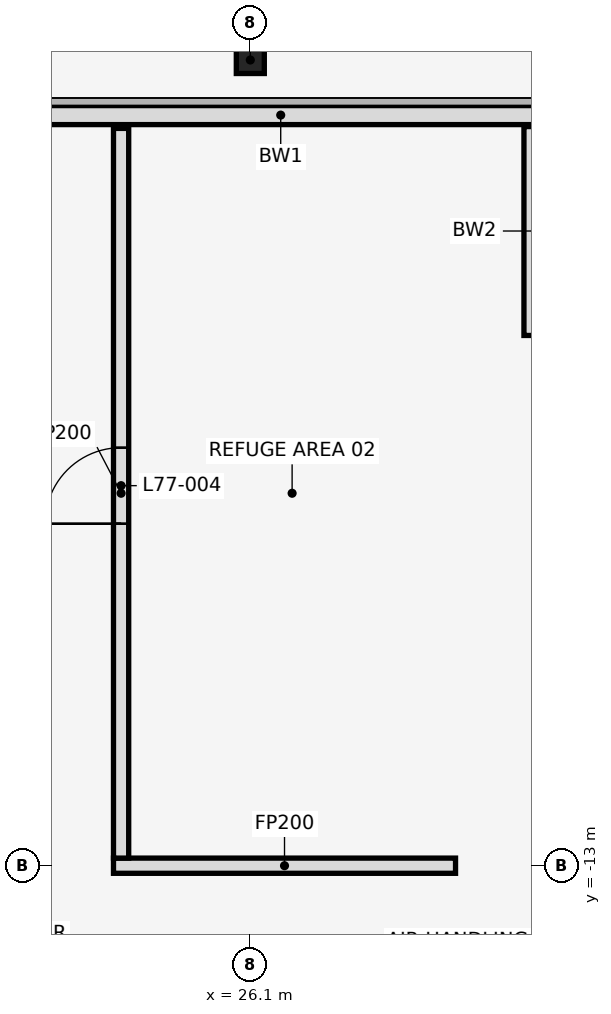
"""IFC4 building model, lengths in metres.
Left out: names, types, materials, properties, quantities, classifications, styles, units other than length and angle.
Written with IfcOpenShell. Run it as: python <this file> out.ifc"""

import sys

from ifc_helpers import new_model, si_unit, direction, frame, frame_2d, origin, origin_2d, place, context, subcontext, project, spatial, rectangle, i_section, extrude, element, fill, save


model = new_model("IFC4")
c1 = context("Model", 3, precision=1e-05, world=origin(), true_north=direction((0.0, 1.0)))
c2 = subcontext(c1, "Body", "Model", "MODEL_VIEW")
j1 = project(units=[si_unit("LENGTHUNIT", "METRE"), si_unit("PLANEANGLEUNIT", "RADIAN")], contexts=[c1])
p1 = place(None, origin())
s1 = spatial("IfcSite", under=j1, at=p1, CompositionType="ELEMENT")
p2 = place(p1, origin())
s2 = spatial("IfcBuilding", under=s1, at=p2, CompositionType="ELEMENT")
p3 = place(p2, frame((0.0, 0.0, 342.5)))
s3 = spatial("IfcBuildingStorey", under=s2, at=p3, CompositionType="ELEMENT", Elevation=342.5)
p4 = place(p3, frame((26.1, -2.4, 0.0), z_axis=(0.0, 0.0, 1.0), x_axis=(1.0, 0.0, 0.0)))
e1 = element("IfcColumn", 1, at=p4, inside=s3, PredefinedType="COLUMN", context=c2, shape_type="SweptSolid", body=[
    extrude(i_section(OverallWidth=0.368, OverallDepth=0.356, WebThickness=0.011, FlangeThickness=0.018, at=origin_2d()), origin(), (0.0, 0.0, 1.0), 5.4),
])
p5 = place(p3, frame((29.85, -6.024, 0.0), z_axis=(0.0, 0.0, 1.0), x_axis=(0.0, 1.0, 0.0)))
e2 = element("IfcWall", 2, at=p5, inside=s3, PredefinedType="STANDARD", context=c2, shape_type="SweptSolid", body=[
    extrude(rectangle(XDim=2.748, YDim=0.3, at=frame_2d((1.374, 0.0))), origin(), (0.0, 0.0, 1.0), 5.2),
])
p6 = place(p3, frame((30.0, -3.125, 0.0), z_axis=(0.0, 0.0, 1.0), x_axis=(-1.0, 0.0, 0.0)))
e3 = element("IfcWall", 3, at=p6, inside=s3, PredefinedType="STANDARD", context=c2, shape_type="SweptSolid", body=[
    extrude(rectangle(XDim=7.0, YDim=0.25, at=frame_2d((3.5, 0.0))), origin(), (0.0, 0.0, 1.0), 5.2),
])
p7 = place(p3, frame((24.3, -13.0, 0.0), z_axis=(0.0, 0.0, 1.0), x_axis=(1.0, 0.0, 0.0)))
e4 = element("IfcWall", 4, at=p7, inside=s3, PredefinedType="PARTITIONING", context=c2, shape_type="SweptSolid", body=[
    extrude(rectangle(XDim=4.5, YDim=0.2, at=frame_2d((2.25, 0.0))), origin(), (0.0, 0.0, 1.0), 4.268),
])
p8 = place(p3, frame((24.4, -12.9, 0.0), z_axis=(0.0, 0.0, 1.0), x_axis=(0.0, 1.0, 0.0)))
e5 = element("IfcWall", 5, at=p8, inside=s3, PredefinedType="PARTITIONING", context=c2, shape_type="SweptSolid", body=[
    extrude(rectangle(XDim=9.6, YDim=0.2, at=frame_2d((4.8, 0.0))), origin(), (0.0, 0.0, 1.0), 4.268),
])
p9 = place(p8, frame((4.4, 0.0, 0.0)))
e6 = element("IfcOpeningElement", 6, at=p9, cuts=e5, PredefinedType="OPENING", context=c2, shape_type="SweptSolid", body=[
    extrude(rectangle(XDim=1.0, YDim=2.1, at=frame_2d((0.5, 1.05))), frame((0.0, 0.112, 0.0), z_axis=(0.0, -1.0, 0.0), x_axis=(1.0, 0.0, 0.0)), (0.0, 0.0, 1.0), 0.224),
])
p10 = place(p9, frame((1.0, 0.0, 0.0), z_axis=(0.0, 0.0, 1.0), x_axis=(-1.0, 0.0, 0.0)))
e7 = element("IfcDoor", 7, at=p10, inside=s3, OperationType="SINGLE_SWING_LEFT", PredefinedType="DOOR", context=c2, shape_type="SweptSolid", body=[
    extrude(rectangle(XDim=1.0, YDim=2.1, at=frame_2d((0.5, 1.05))), frame((0.0, 0.025, 0.0), z_axis=(0.0, -1.0, 0.0), x_axis=(1.0, 0.0, 0.0)), (0.0, 0.0, 1.0), 0.05),
])
fill(e6, e7)
save(model, sys.argv[1])
